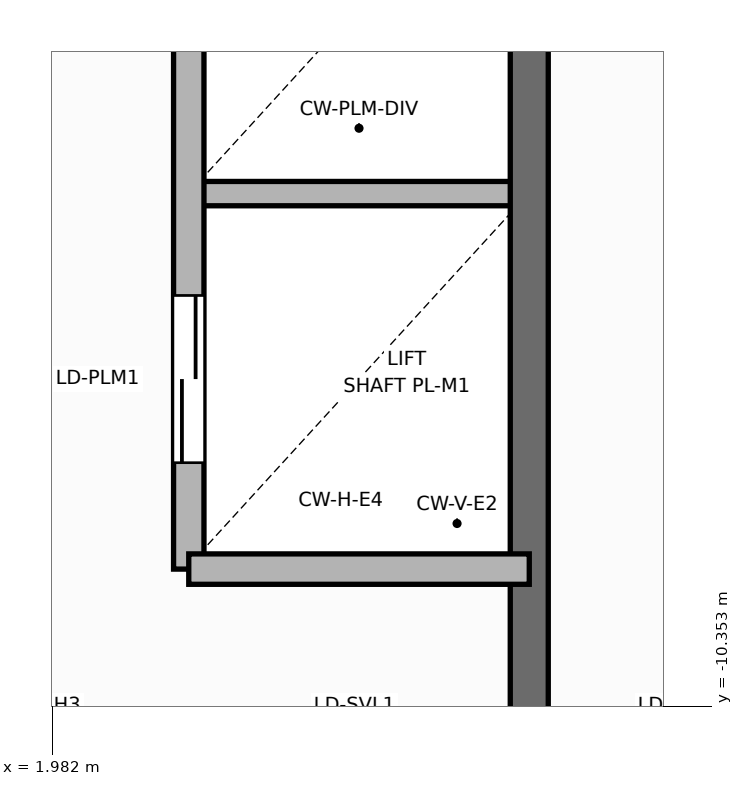
"""IFC4 building model, lengths in metres.
Left out: names, types, materials, properties, quantities, classifications, styles, units other than length and angle.
Written with IfcOpenShell. Run it as: python <this file> out.ifc"""

import sys

from ifc_helpers import new_model, si_unit, direction, frame, frame_2d, origin, place, context, subcontext, project, spatial, rectangle, extrude, element, fill, save


model = new_model("IFC4")
c1 = context("Model", 3, precision=1e-05, world=origin(), true_north=direction((0.0, 1.0)))
c2 = subcontext(c1, "Body", "Model", "MODEL_VIEW")
j1 = project(units=[si_unit("LENGTHUNIT", "METRE"), si_unit("PLANEANGLEUNIT", "RADIAN")], contexts=[c1])
p1 = place(None, origin())
s1 = spatial("IfcSite", under=j1, at=p1, CompositionType="ELEMENT")
p2 = place(p1, origin())
s2 = spatial("IfcBuilding", under=s1, at=p2, CompositionType="ELEMENT")
p3 = place(p2, frame((0.0, 0.0, 18.9)))
s3 = spatial("IfcBuildingStorey", under=s2, at=p3, CompositionType="ELEMENT", Elevation=18.9)
p4 = place(p3, frame((2.88, -6.98, 0.0), z_axis=(0.0, 0.0, 1.0), x_axis=(1.0, 0.0, 0.0)))
e1 = element("IfcWall", 1, at=p4, inside=s3, PredefinedType="PARTITIONING", context=c2, shape_type="SweptSolid", body=[
    extrude(rectangle(XDim=2.24, YDim=0.16, at=frame_2d((1.12, 0.0))), origin(), (0.0, 0.0, 1.0), 5.15),
])
p5 = place(p3, frame((5.12, -13.85, 0.0), z_axis=(0.0, 0.0, 1.0), x_axis=(0.0, 1.0, 0.0)))
e2 = element("IfcWall", 2, at=p5, inside=s3, PredefinedType="SHEAR", context=c2, shape_type="SweptSolid", body=[
    extrude(rectangle(XDim=9.4, YDim=0.25, at=frame_2d((4.7, 0.0))), origin(), (0.0, 0.0, 1.0), 5.4),
])
p6 = place(p3, frame((2.88, -9.45, 0.0), z_axis=(0.0, 0.0, 1.0), x_axis=(0.0, 1.0, 0.0)))
e3 = element("IfcWall", 3, at=p6, inside=s3, PredefinedType="SOLIDWALL", context=c2, shape_type="SweptSolid", body=[
    extrude(rectangle(XDim=5.0, YDim=0.2, at=frame_2d((2.5, 0.0))), origin(), (0.0, 0.0, 1.0), 5.15),
])
p7 = place(p6, frame((0.7, 0.0, 0.0)))
e4 = element("IfcOpeningElement", 4, at=p7, cuts=e3, PredefinedType="OPENING", context=c2, shape_type="SweptSolid", body=[
    extrude(rectangle(XDim=1.106, YDim=2.104, at=frame_2d((0.55, 1.052))), frame((0.0, 0.11, 0.0), z_axis=(0.0, -1.0, 0.0), x_axis=(1.0, 0.0, 0.0)), (0.0, 0.0, 1.0), 0.22),
])
p8 = place(p3, frame((2.88, -9.45, 0.0), z_axis=(0.0, 0.0, 1.0), x_axis=(1.0, 0.0, 0.0)))
e5 = element("IfcWall", 5, at=p8, inside=s3, PredefinedType="SOLIDWALL", context=c2, shape_type="SweptSolid", body=[
    extrude(rectangle(XDim=2.24, YDim=0.2, at=frame_2d((1.12, 0.0))), origin(), (0.0, 0.0, 1.0), 5.15),
])
p9 = place(p7, origin())
e6 = element("IfcDoor", 6, at=p9, inside=s3, OperationType="DOUBLE_DOOR_SLIDING", PredefinedType="DOOR", context=c2, shape_type="SweptSolid", body=[
    extrude(rectangle(XDim=1.1, YDim=2.1, at=frame_2d((0.55, 1.05))), frame((0.0, 0.025, 0.0), z_axis=(0.0, -1.0, 0.0), x_axis=(1.0, 0.0, 0.0)), (0.0, 0.0, 1.0), 0.05),
])
fill(e4, e6)
save(model, sys.argv[1])
